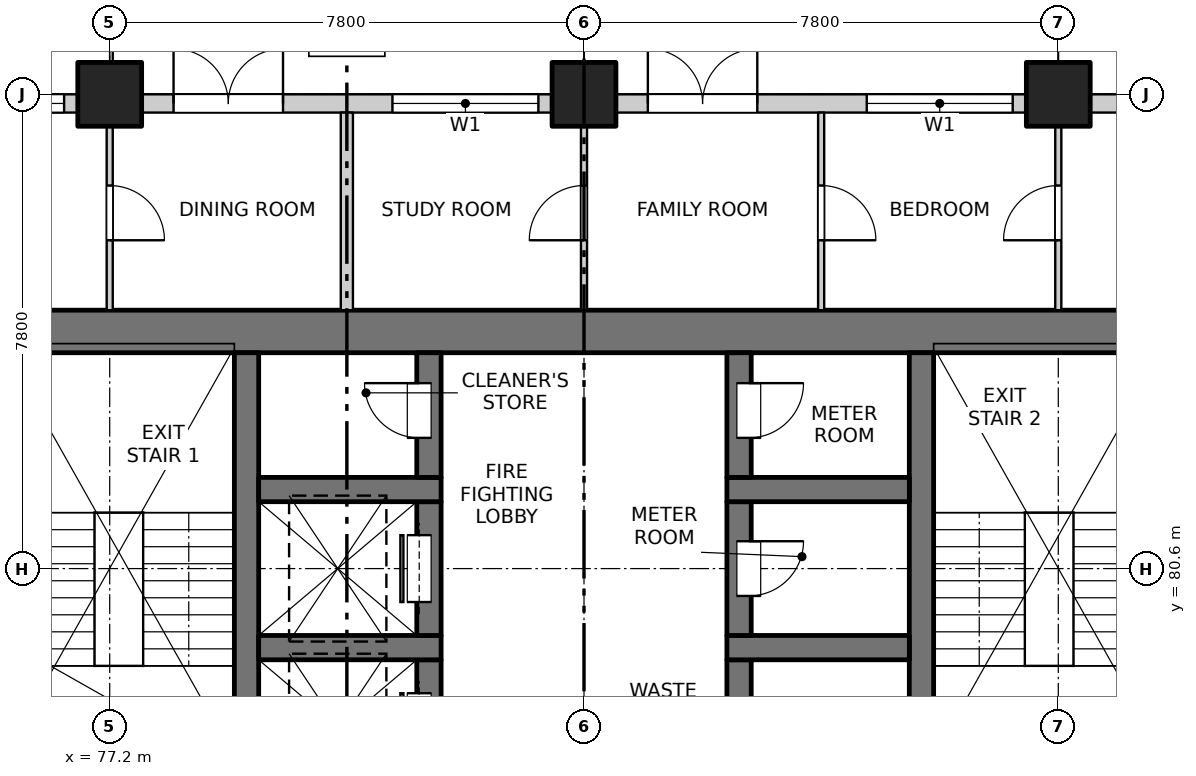
"""IFC4 building model, lengths in metres.
Left out: names, types, materials, properties, quantities, classifications, styles, units other than length and angle.
Written with IfcOpenShell. Run it as: python <this file> out.ifc"""

import sys

from ifc_helpers import new_model, si_unit, direction, frame, frame_2d, origin, origin_2d, place, context, subcontext, project, spatial, rectangle, extrude, element, fill, save


model = new_model("IFC4")
c1 = context("Model", 3, precision=1e-05, world=origin(), true_north=direction((0.0, 1.0)))
c2 = subcontext(c1, "Body", "Model", "MODEL_VIEW")
j1 = project(units=[si_unit("LENGTHUNIT", "METRE"), si_unit("PLANEANGLEUNIT", "RADIAN")], contexts=[c1])
p1 = place(None, origin())
s1 = spatial("IfcSite", under=j1, at=p1, CompositionType="ELEMENT")
p2 = place(p1, origin())
s2 = spatial("IfcBuilding", under=s1, at=p2, CompositionType="ELEMENT")
p3 = place(p2, frame((0.0, 0.0, 43.3)))
s3 = spatial("IfcBuildingStorey", under=s2, at=p3, CompositionType="ELEMENT", Elevation=43.3)
for number, where, z_axis, x_axis in (
    (1, (77.2, 88.4, -0.25), (0.0, 0.0, 1.0), (1.0, 0.0, 0.0)),
    (2, (85.0, 88.4, -0.25), (0.0, 0.0, 1.0), (1.0, 0.0, 0.0)),
    (3, (92.8, 88.4, -0.25), (0.0, 0.0, 1.0), (1.0, 0.0, 0.0)),
):
    element("IfcColumn", number, at=place(p3, frame(where, z_axis=z_axis, x_axis=x_axis)), inside=s3, PredefinedType="COLUMN", context=c2, shape_type="SweptSolid", body=[
        extrude(rectangle(XDim=1.05, YDim=1.05, at=origin_2d()), origin(), (0.0, 0.0, 1.0), 3.35),
    ])
p4 = place(p3, frame((75.6, 84.5, -0.25), z_axis=(0.0, 0.0, 1.0), x_axis=(1.0, 0.0, 0.0)))
e4 = element("IfcWall", 4, at=p4, inside=s3, PredefinedType="SOLIDWALL", context=c2, shape_type="SweptSolid", body=[
    extrude(rectangle(XDim=18.8, YDim=0.7, at=frame_2d((9.4, 0.0))), origin(), (0.0, 0.0, 1.0), 3.35),
])
for number, where, z_axis, x_axis in (
    (5, (79.45, 77.3, -0.25), (0.0, 0.0, 1.0), (0.0, 1.0, 0.0)),
    (6, (90.55, 77.3, -0.25), (0.0, 0.0, 1.0), (0.0, 1.0, 0.0)),
):
    element("IfcWall", number, at=place(p3, frame(where, z_axis=z_axis, x_axis=x_axis)), inside=s3, PredefinedType="SOLIDWALL", context=c2, shape_type="SweptSolid", body=[
        extrude(rectangle(XDim=6.85, YDim=0.4, at=frame_2d((3.425, 0.0))), origin(), (0.0, 0.0, 1.0), 3.35),
    ])
p5 = place(p3, frame((82.45, 76.9, -0.25), z_axis=(0.0, 0.0, 1.0), x_axis=(0.0, 1.0, 0.0)))
e7 = element("IfcWall", 7, at=p5, inside=s3, PredefinedType="SOLIDWALL", context=c2, shape_type="SweptSolid", body=[
    extrude(rectangle(XDim=2.2, YDim=0.4, at=frame_2d((1.1, 0.0))), origin(), (0.0, 0.0, 1.0), 3.35),
])
p6 = place(p5, frame((0.55, 0.0, 0.25)))
e8 = element("IfcOpeningElement", 8, at=p6, cuts=e7, PredefinedType="OPENING", context=c2, shape_type="SweptSolid", body=[
    extrude(rectangle(XDim=1.1, YDim=2.1, at=frame_2d((0.55, 1.05))), frame((0.0, 0.21, 0.0), z_axis=(0.0, -1.0, 0.0), x_axis=(1.0, 0.0, 0.0)), (0.0, 0.0, 1.0), 0.42),
])
p7 = place(p3, frame((79.65, 79.3, -0.25), z_axis=(0.0, 0.0, 1.0), x_axis=(1.0, 0.0, 0.0)))
e9 = element("IfcWall", 9, at=p7, inside=s3, PredefinedType="SOLIDWALL", context=c2, shape_type="SweptSolid", body=[
    extrude(rectangle(XDim=3.0, YDim=0.4, at=frame_2d((1.5, 0.0))), origin(), (0.0, 0.0, 1.0), 3.35),
])
p8 = place(p3, frame((82.45, 79.5, -0.25), z_axis=(0.0, 0.0, 1.0), x_axis=(0.0, 1.0, 0.0)))
e10 = element("IfcWall", 10, at=p8, inside=s3, PredefinedType="SOLIDWALL", context=c2, shape_type="SweptSolid", body=[
    extrude(rectangle(XDim=2.2, YDim=0.4, at=frame_2d((1.1, 0.0))), origin(), (0.0, 0.0, 1.0), 3.35),
])
p9 = place(p8, frame((0.55, 0.0, 0.25)))
e11 = element("IfcOpeningElement", 11, at=p9, cuts=e10, PredefinedType="OPENING", context=c2, shape_type="SweptSolid", body=[
    extrude(rectangle(XDim=1.1, YDim=2.1, at=frame_2d((0.55, 1.05))), frame((0.0, 0.21, 0.0), z_axis=(0.0, -1.0, 0.0), x_axis=(1.0, 0.0, 0.0)), (0.0, 0.0, 1.0), 0.42),
])
p10 = place(p3, frame((79.65, 81.9, -0.25), z_axis=(0.0, 0.0, 1.0), x_axis=(1.0, 0.0, 0.0)))
e12 = element("IfcWall", 12, at=p10, inside=s3, PredefinedType="SOLIDWALL", context=c2, shape_type="SweptSolid", body=[
    extrude(rectangle(XDim=3.0, YDim=0.4, at=frame_2d((1.5, 0.0))), origin(), (0.0, 0.0, 1.0), 3.35),
])
p11 = place(p3, frame((82.45, 82.1, -0.25), z_axis=(0.0, 0.0, 1.0), x_axis=(0.0, 1.0, 0.0)))
e13 = element("IfcWall", 13, at=p11, inside=s3, PredefinedType="SOLIDWALL", context=c2, shape_type="SweptSolid", body=[
    extrude(rectangle(XDim=2.05, YDim=0.4, at=frame_2d((1.025, 0.0))), origin(), (0.0, 0.0, 1.0), 3.35),
])
p12 = place(p11, frame((0.65, 0.0, 0.25)))
e14 = element("IfcOpeningElement", 14, at=p12, cuts=e13, PredefinedType="OPENING", context=c2, shape_type="SweptSolid", body=[
    extrude(rectangle(XDim=0.9, YDim=2.1, at=frame_2d((0.45, 1.05))), frame((0.0, 0.21, 0.0), z_axis=(0.0, -1.0, 0.0), x_axis=(1.0, 0.0, 0.0)), (0.0, 0.0, 1.0), 0.42),
])
p13 = place(p3, frame((87.55, 76.9, -0.25), z_axis=(0.0, 0.0, 1.0), x_axis=(0.0, 1.0, 0.0)))
e15 = element("IfcWall", 15, at=p13, inside=s3, PredefinedType="SOLIDWALL", context=c2, shape_type="SweptSolid", body=[
    extrude(rectangle(XDim=2.2, YDim=0.4, at=frame_2d((1.1, 0.0))), origin(), (0.0, 0.0, 1.0), 3.35),
])
p14 = place(p13, frame((0.65, 0.0, 0.25)))
e16 = element("IfcOpeningElement", 16, at=p14, cuts=e15, PredefinedType="OPENING", context=c2, shape_type="SweptSolid", body=[
    extrude(rectangle(XDim=0.9, YDim=2.1, at=frame_2d((0.45, 1.05))), frame((0.0, 0.21, 0.0), z_axis=(0.0, -1.0, 0.0), x_axis=(1.0, 0.0, 0.0)), (0.0, 0.0, 1.0), 0.42),
])
p15 = place(p3, frame((87.35, 79.3, -0.25), z_axis=(0.0, 0.0, 1.0), x_axis=(1.0, 0.0, 0.0)))
e17 = element("IfcWall", 17, at=p15, inside=s3, PredefinedType="SOLIDWALL", context=c2, shape_type="SweptSolid", body=[
    extrude(rectangle(XDim=3.0, YDim=0.4, at=frame_2d((1.5, 0.0))), origin(), (0.0, 0.0, 1.0), 3.35),
])
p16 = place(p3, frame((87.55, 79.5, -0.25), z_axis=(0.0, 0.0, 1.0), x_axis=(0.0, 1.0, 0.0)))
e18 = element("IfcWall", 18, at=p16, inside=s3, PredefinedType="SOLIDWALL", context=c2, shape_type="SweptSolid", body=[
    extrude(rectangle(XDim=2.2, YDim=0.4, at=frame_2d((1.1, 0.0))), origin(), (0.0, 0.0, 1.0), 3.35),
])
p17 = place(p16, frame((0.65, 0.0, 0.25)))
e19 = element("IfcOpeningElement", 19, at=p17, cuts=e18, PredefinedType="OPENING", context=c2, shape_type="SweptSolid", body=[
    extrude(rectangle(XDim=0.9, YDim=2.1, at=frame_2d((0.45, 1.05))), frame((0.0, 0.21, 0.0), z_axis=(0.0, -1.0, 0.0), x_axis=(1.0, 0.0, 0.0)), (0.0, 0.0, 1.0), 0.42),
])
p18 = place(p3, frame((87.35, 81.9, -0.25), z_axis=(0.0, 0.0, 1.0), x_axis=(1.0, 0.0, 0.0)))
e20 = element("IfcWall", 20, at=p18, inside=s3, PredefinedType="SOLIDWALL", context=c2, shape_type="SweptSolid", body=[
    extrude(rectangle(XDim=3.0, YDim=0.4, at=frame_2d((1.5, 0.0))), origin(), (0.0, 0.0, 1.0), 3.35),
])
p19 = place(p3, frame((87.55, 82.1, -0.25), z_axis=(0.0, 0.0, 1.0), x_axis=(0.0, 1.0, 0.0)))
e21 = element("IfcWall", 21, at=p19, inside=s3, PredefinedType="SOLIDWALL", context=c2, shape_type="SweptSolid", body=[
    extrude(rectangle(XDim=2.05, YDim=0.4, at=frame_2d((1.025, 0.0))), origin(), (0.0, 0.0, 1.0), 3.35),
])
p20 = place(p19, frame((0.65, 0.0, 0.25)))
e22 = element("IfcOpeningElement", 22, at=p20, cuts=e21, PredefinedType="OPENING", context=c2, shape_type="SweptSolid", body=[
    extrude(rectangle(XDim=0.9, YDim=2.1, at=frame_2d((0.45, 1.05))), frame((0.0, 0.21, 0.0), z_axis=(0.0, -1.0, 0.0), x_axis=(1.0, 0.0, 0.0)), (0.0, 0.0, 1.0), 0.42),
])
p21 = place(p3, frame((69.925, 88.25, 0.0), z_axis=(0.0, 0.0, 1.0), x_axis=(1.0, 0.0, 0.0)))
e23 = element("IfcWall", 23, at=p21, inside=s3, PredefinedType="SOLIDWALL", context=c2, shape_type="SweptSolid", body=[
    extrude(rectangle(XDim=6.75, YDim=0.3, at=frame_2d((3.375, 0.0))), origin(), (0.0, 0.0, 1.0), 3.1),
])
p22 = place(p21, frame((0.225, 0.0, 0.9)))
e24 = element("IfcOpeningElement", 24, at=p22, cuts=e23, PredefinedType="OPENING", context=c2, shape_type="SweptSolid", body=[
    extrude(rectangle(XDim=2.4, YDim=1.8, at=frame_2d((1.2, 0.9))), frame((0.0, 0.16, 0.0), z_axis=(0.0, -1.0, 0.0), x_axis=(1.0, 0.0, 0.0)), (0.0, 0.0, 1.0), 0.32),
])
p23 = place(p21, frame((4.125, 0.0, 0.9)))
e25 = element("IfcOpeningElement", 25, at=p23, cuts=e23, PredefinedType="OPENING", context=c2, shape_type="SweptSolid", body=[
    extrude(rectangle(XDim=2.4, YDim=1.8, at=frame_2d((1.2, 0.9))), frame((0.0, 0.16, 0.0), z_axis=(0.0, -1.0, 0.0), x_axis=(1.0, 0.0, 0.0)), (0.0, 0.0, 1.0), 0.32),
])
p24 = place(p3, frame((77.725, 88.25, 0.0), z_axis=(0.0, 0.0, 1.0), x_axis=(1.0, 0.0, 0.0)))
e26 = element("IfcWall", 26, at=p24, inside=s3, PredefinedType="SOLIDWALL", context=c2, shape_type="SweptSolid", body=[
    extrude(rectangle(XDim=6.75, YDim=0.3, at=frame_2d((3.375, 0.0))), origin(), (0.0, 0.0, 1.0), 3.1),
])
p25 = place(p24, frame((0.525, 0.0, 0.0)))
e27 = element("IfcOpeningElement", 27, at=p25, cuts=e26, PredefinedType="OPENING", context=c2, shape_type="SweptSolid", body=[
    extrude(rectangle(XDim=1.8, YDim=2.4, at=frame_2d((0.9, 1.2))), frame((0.0, 0.16, 0.0), z_axis=(0.0, -1.0, 0.0), x_axis=(1.0, 0.0, 0.0)), (0.0, 0.0, 1.0), 0.32),
])
p26 = place(p24, frame((4.125, 0.0, 0.9)))
e28 = element("IfcOpeningElement", 28, at=p26, cuts=e26, PredefinedType="OPENING", context=c2, shape_type="SweptSolid", body=[
    extrude(rectangle(XDim=2.4, YDim=1.8, at=frame_2d((1.2, 0.9))), frame((0.0, 0.16, 0.0), z_axis=(0.0, -1.0, 0.0), x_axis=(1.0, 0.0, 0.0)), (0.0, 0.0, 1.0), 0.32),
])
p27 = place(p3, frame((85.525, 88.25, 0.0), z_axis=(0.0, 0.0, 1.0), x_axis=(1.0, 0.0, 0.0)))
e29 = element("IfcWall", 29, at=p27, inside=s3, PredefinedType="SOLIDWALL", context=c2, shape_type="SweptSolid", body=[
    extrude(rectangle(XDim=6.75, YDim=0.3, at=frame_2d((3.375, 0.0))), origin(), (0.0, 0.0, 1.0), 3.1),
])
p28 = place(p27, frame((0.525, 0.0, 0.0)))
e30 = element("IfcOpeningElement", 30, at=p28, cuts=e29, PredefinedType="OPENING", context=c2, shape_type="SweptSolid", body=[
    extrude(rectangle(XDim=1.8, YDim=2.4, at=frame_2d((0.9, 1.2))), frame((0.0, 0.16, 0.0), z_axis=(0.0, -1.0, 0.0), x_axis=(1.0, 0.0, 0.0)), (0.0, 0.0, 1.0), 0.32),
])
p29 = place(p27, frame((4.125, 0.0, 0.9)))
e31 = element("IfcOpeningElement", 31, at=p29, cuts=e29, PredefinedType="OPENING", context=c2, shape_type="SweptSolid", body=[
    extrude(rectangle(XDim=2.4, YDim=1.8, at=frame_2d((1.2, 0.9))), frame((0.0, 0.16, 0.0), z_axis=(0.0, -1.0, 0.0), x_axis=(1.0, 0.0, 0.0)), (0.0, 0.0, 1.0), 0.32),
])
p30 = place(p3, frame((93.325, 88.25, 0.0), z_axis=(0.0, 0.0, 1.0), x_axis=(1.0, 0.0, 0.0)))
e32 = element("IfcWall", 32, at=p30, inside=s3, PredefinedType="SOLIDWALL", context=c2, shape_type="SweptSolid", body=[
    extrude(rectangle(XDim=6.75, YDim=0.3, at=frame_2d((3.375, 0.0))), origin(), (0.0, 0.0, 1.0), 3.1),
])
p31 = place(p30, frame((0.525, 0.0, 0.0)))
e33 = element("IfcOpeningElement", 33, at=p31, cuts=e32, PredefinedType="OPENING", context=c2, shape_type="SweptSolid", body=[
    extrude(rectangle(XDim=1.8, YDim=2.4, at=frame_2d((0.9, 1.2))), frame((0.0, 0.16, 0.0), z_axis=(0.0, -1.0, 0.0), x_axis=(1.0, 0.0, 0.0)), (0.0, 0.0, 1.0), 0.32),
])
p32 = place(p30, frame((4.125, 0.0, 0.9)))
e34 = element("IfcOpeningElement", 34, at=p32, cuts=e32, PredefinedType="OPENING", context=c2, shape_type="SweptSolid", body=[
    extrude(rectangle(XDim=2.4, YDim=1.8, at=frame_2d((1.2, 0.9))), frame((0.0, 0.16, 0.0), z_axis=(0.0, -1.0, 0.0), x_axis=(1.0, 0.0, 0.0)), (0.0, 0.0, 1.0), 0.32),
])
p33 = place(p3, frame((77.2, 84.85, 0.0), z_axis=(0.0, 0.0, 1.0), x_axis=(0.0, 1.0, 0.0)))
e35 = element("IfcWall", 35, at=p33, inside=s3, PredefinedType="PARTITIONING", context=c2, shape_type="SweptSolid", body=[
    extrude(rectangle(XDim=3.25, YDim=0.1, at=frame_2d((1.625, 0.0))), origin(), (0.0, 0.0, 1.0), 3.1),
])
p34 = place(p33, frame((1.15, 0.0, 0.0)))
e36 = element("IfcOpeningElement", 36, at=p34, cuts=e35, PredefinedType="OPENING", context=c2, shape_type="SweptSolid", body=[
    extrude(rectangle(XDim=0.9, YDim=2.1, at=frame_2d((0.45, 1.05))), frame((0.0, 0.06, 0.0), z_axis=(0.0, -1.0, 0.0), x_axis=(1.0, 0.0, 0.0)), (0.0, 0.0, 1.0), 0.12),
])
p35 = place(p3, frame((81.1, 84.85, 0.0), z_axis=(0.0, 0.0, 1.0), x_axis=(0.0, 1.0, 0.0)))
e37 = element("IfcWall", 37, at=p35, inside=s3, PredefinedType="PARTITIONING", context=c2, shape_type="SweptSolid", body=[
    extrude(rectangle(XDim=3.25, YDim=0.2, at=frame_2d((1.625, 0.0))), origin(), (0.0, 0.0, 1.0), 3.1),
])
p36 = place(p3, frame((85.0, 84.85, 0.0), z_axis=(0.0, 0.0, 1.0), x_axis=(0.0, 1.0, 0.0)))
e38 = element("IfcWall", 38, at=p36, inside=s3, PredefinedType="PARTITIONING", context=c2, shape_type="SweptSolid", body=[
    extrude(rectangle(XDim=3.25, YDim=0.1, at=frame_2d((1.625, 0.0))), origin(), (0.0, 0.0, 1.0), 3.1),
])
p37 = place(p36, frame((1.15, 0.0, 0.0)))
e39 = element("IfcOpeningElement", 39, at=p37, cuts=e38, PredefinedType="OPENING", context=c2, shape_type="SweptSolid", body=[
    extrude(rectangle(XDim=0.9, YDim=2.1, at=frame_2d((0.45, 1.05))), frame((0.0, 0.06, 0.0), z_axis=(0.0, -1.0, 0.0), x_axis=(1.0, 0.0, 0.0)), (0.0, 0.0, 1.0), 0.12),
])
p38 = place(p3, frame((88.9, 84.85, 0.0), z_axis=(0.0, 0.0, 1.0), x_axis=(0.0, 1.0, 0.0)))
e40 = element("IfcWall", 40, at=p38, inside=s3, PredefinedType="PARTITIONING", context=c2, shape_type="SweptSolid", body=[
    extrude(rectangle(XDim=3.25, YDim=0.1, at=frame_2d((1.625, 0.0))), origin(), (0.0, 0.0, 1.0), 3.1),
])
p39 = place(p38, frame((1.15, 0.0, 0.0)))
e41 = element("IfcOpeningElement", 41, at=p39, cuts=e40, PredefinedType="OPENING", context=c2, shape_type="SweptSolid", body=[
    extrude(rectangle(XDim=0.9, YDim=2.1, at=frame_2d((0.45, 1.05))), frame((0.0, 0.06, 0.0), z_axis=(0.0, -1.0, 0.0), x_axis=(1.0, 0.0, 0.0)), (0.0, 0.0, 1.0), 0.12),
])
p40 = place(p3, frame((92.8, 84.85, 0.0), z_axis=(0.0, 0.0, 1.0), x_axis=(0.0, 1.0, 0.0)))
e42 = element("IfcWall", 42, at=p40, inside=s3, PredefinedType="PARTITIONING", context=c2, shape_type="SweptSolid", body=[
    extrude(rectangle(XDim=3.25, YDim=0.1, at=frame_2d((1.625, 0.0))), origin(), (0.0, 0.0, 1.0), 3.1),
])
p41 = place(p40, frame((1.15, 0.0, 0.0)))
e43 = element("IfcOpeningElement", 43, at=p41, cuts=e42, PredefinedType="OPENING", context=c2, shape_type="SweptSolid", body=[
    extrude(rectangle(XDim=0.9, YDim=2.1, at=frame_2d((0.45, 1.05))), frame((0.0, 0.06, 0.0), z_axis=(0.0, -1.0, 0.0), x_axis=(1.0, 0.0, 0.0)), (0.0, 0.0, 1.0), 0.12),
])
p42 = place(p23, origin())
e44 = element("IfcWindow", 44, at=p42, inside=s3, PartitioningType="DOUBLE_PANEL_VERTICAL", PredefinedType="WINDOW", context=c2, shape_type="SweptSolid", body=[
    extrude(rectangle(XDim=2.4, YDim=1.8, at=frame_2d((1.2, 0.9))), frame((0.0, 0.03, 0.0), z_axis=(0.0, -1.0, 0.0), x_axis=(1.0, 0.0, 0.0)), (0.0, 0.0, 1.0), 0.06),
])
fill(e25, e44)
p43 = place(p25, origin())
e45 = element("IfcDoor", 45, at=p43, inside=s3, OperationType="DOUBLE_DOOR_SINGLE_SWING", PredefinedType="DOOR", context=c2, shape_type="SweptSolid", body=[
    extrude(rectangle(XDim=1.8, YDim=2.4, at=frame_2d((0.9, 1.2))), frame((0.0, 0.025, 0.0), z_axis=(0.0, -1.0, 0.0), x_axis=(1.0, 0.0, 0.0)), (0.0, 0.0, 1.0), 0.05),
])
fill(e27, e45)
p44 = place(p26, origin())
e46 = element("IfcWindow", 46, at=p44, inside=s3, PartitioningType="DOUBLE_PANEL_VERTICAL", PredefinedType="WINDOW", context=c2, shape_type="SweptSolid", body=[
    extrude(rectangle(XDim=2.4, YDim=1.8, at=frame_2d((1.2, 0.9))), frame((0.0, 0.03, 0.0), z_axis=(0.0, -1.0, 0.0), x_axis=(1.0, 0.0, 0.0)), (0.0, 0.0, 1.0), 0.06),
])
fill(e28, e46)
p45 = place(p28, origin())
e47 = element("IfcDoor", 47, at=p45, inside=s3, OperationType="DOUBLE_DOOR_SINGLE_SWING", PredefinedType="DOOR", context=c2, shape_type="SweptSolid", body=[
    extrude(rectangle(XDim=1.8, YDim=2.4, at=frame_2d((0.9, 1.2))), frame((0.0, 0.025, 0.0), z_axis=(0.0, -1.0, 0.0), x_axis=(1.0, 0.0, 0.0)), (0.0, 0.0, 1.0), 0.05),
])
fill(e30, e47)
p46 = place(p29, origin())
e48 = element("IfcWindow", 48, at=p46, inside=s3, PartitioningType="DOUBLE_PANEL_VERTICAL", PredefinedType="WINDOW", context=c2, shape_type="SweptSolid", body=[
    extrude(rectangle(XDim=2.4, YDim=1.8, at=frame_2d((1.2, 0.9))), frame((0.0, 0.03, 0.0), z_axis=(0.0, -1.0, 0.0), x_axis=(1.0, 0.0, 0.0)), (0.0, 0.0, 1.0), 0.06),
])
fill(e31, e48)
p47 = place(p6, origin())
e49 = element("IfcDoor", 49, at=p47, inside=s3, OperationType="SLIDING_TO_LEFT", PredefinedType="DOOR", context=c2, shape_type="SweptSolid", body=[
    extrude(rectangle(XDim=1.1, YDim=2.1, at=frame_2d((0.55, 1.05))), frame((0.0, 0.185, 0.0), z_axis=(0.0, -1.0, 0.0), x_axis=(1.0, 0.0, 0.0)), (0.0, 0.0, 1.0), 0.05),
])
fill(e8, e49)
p48 = place(p9, origin())
e50 = element("IfcDoor", 50, at=p48, inside=s3, OperationType="SLIDING_TO_LEFT", PredefinedType="DOOR", context=c2, shape_type="SweptSolid", body=[
    extrude(rectangle(XDim=1.1, YDim=2.1, at=frame_2d((0.55, 1.05))), frame((0.0, 0.185, 0.0), z_axis=(0.0, -1.0, 0.0), x_axis=(1.0, 0.0, 0.0)), (0.0, 0.0, 1.0), 0.05),
])
fill(e11, e50)
p49 = place(p17, origin())
e51 = element("IfcDoor", 51, at=p49, inside=s3, OperationType="SINGLE_SWING_LEFT", PredefinedType="DOOR", context=c2, shape_type="SweptSolid", body=[
    extrude(rectangle(XDim=0.9, YDim=2.1, at=frame_2d((0.45, 1.05))), frame((0.0, -0.135, 0.0), z_axis=(0.0, -1.0, 0.0), x_axis=(1.0, 0.0, 0.0)), (0.0, 0.0, 1.0), 0.05),
])
fill(e19, e51)
p50 = place(p12, origin())
e52 = element("IfcDoor", 52, at=p50, inside=s3, OperationType="SINGLE_SWING_RIGHT", PredefinedType="DOOR", context=c2, shape_type="SweptSolid", body=[
    extrude(rectangle(XDim=0.9, YDim=2.1, at=frame_2d((0.45, 1.05))), frame((0.0, 0.185, 0.0), z_axis=(0.0, -1.0, 0.0), x_axis=(1.0, 0.0, 0.0)), (0.0, 0.0, 1.0), 0.05),
])
fill(e14, e52)
p51 = place(p20, origin())
e53 = element("IfcDoor", 53, at=p51, inside=s3, OperationType="SINGLE_SWING_LEFT", PredefinedType="DOOR", context=c2, shape_type="SweptSolid", body=[
    extrude(rectangle(XDim=0.9, YDim=2.1, at=frame_2d((0.45, 1.05))), frame((0.0, -0.135, 0.0), z_axis=(0.0, -1.0, 0.0), x_axis=(1.0, 0.0, 0.0)), (0.0, 0.0, 1.0), 0.05),
])
fill(e22, e53)
p52 = place(p34, origin())
e54 = element("IfcDoor", 54, at=p52, inside=s3, OperationType="SINGLE_SWING_RIGHT", PredefinedType="DOOR", context=c2, shape_type="SweptSolid", body=[
    extrude(rectangle(XDim=0.9, YDim=2.1, at=frame_2d((0.45, 1.05))), frame((0.0, 0.025, 0.0), z_axis=(0.0, -1.0, 0.0), x_axis=(1.0, 0.0, 0.0)), (0.0, 0.0, 1.0), 0.05),
])
fill(e36, e54)
p53 = place(p37, origin())
e55 = element("IfcDoor", 55, at=p53, inside=s3, OperationType="SINGLE_SWING_LEFT", PredefinedType="DOOR", context=c2, shape_type="SweptSolid", body=[
    extrude(rectangle(XDim=0.9, YDim=2.1, at=frame_2d((0.45, 1.05))), frame((0.0, 0.025, 0.0), z_axis=(0.0, -1.0, 0.0), x_axis=(1.0, 0.0, 0.0)), (0.0, 0.0, 1.0), 0.05),
])
fill(e39, e55)
p54 = place(p39, origin())
e56 = element("IfcDoor", 56, at=p54, inside=s3, OperationType="SINGLE_SWING_RIGHT", PredefinedType="DOOR", context=c2, shape_type="SweptSolid", body=[
    extrude(rectangle(XDim=0.9, YDim=2.1, at=frame_2d((0.45, 1.05))), frame((0.0, 0.025, 0.0), z_axis=(0.0, -1.0, 0.0), x_axis=(1.0, 0.0, 0.0)), (0.0, 0.0, 1.0), 0.05),
])
fill(e41, e56)
p55 = place(p41, origin())
e57 = element("IfcDoor", 57, at=p55, inside=s3, OperationType="SINGLE_SWING_LEFT", PredefinedType="DOOR", context=c2, shape_type="SweptSolid", body=[
    extrude(rectangle(XDim=0.9, YDim=2.1, at=frame_2d((0.45, 1.05))), frame((0.0, 0.025, 0.0), z_axis=(0.0, -1.0, 0.0), x_axis=(1.0, 0.0, 0.0)), (0.0, 0.0, 1.0), 0.05),
])
fill(e43, e57)
save(model, sys.argv[1])
